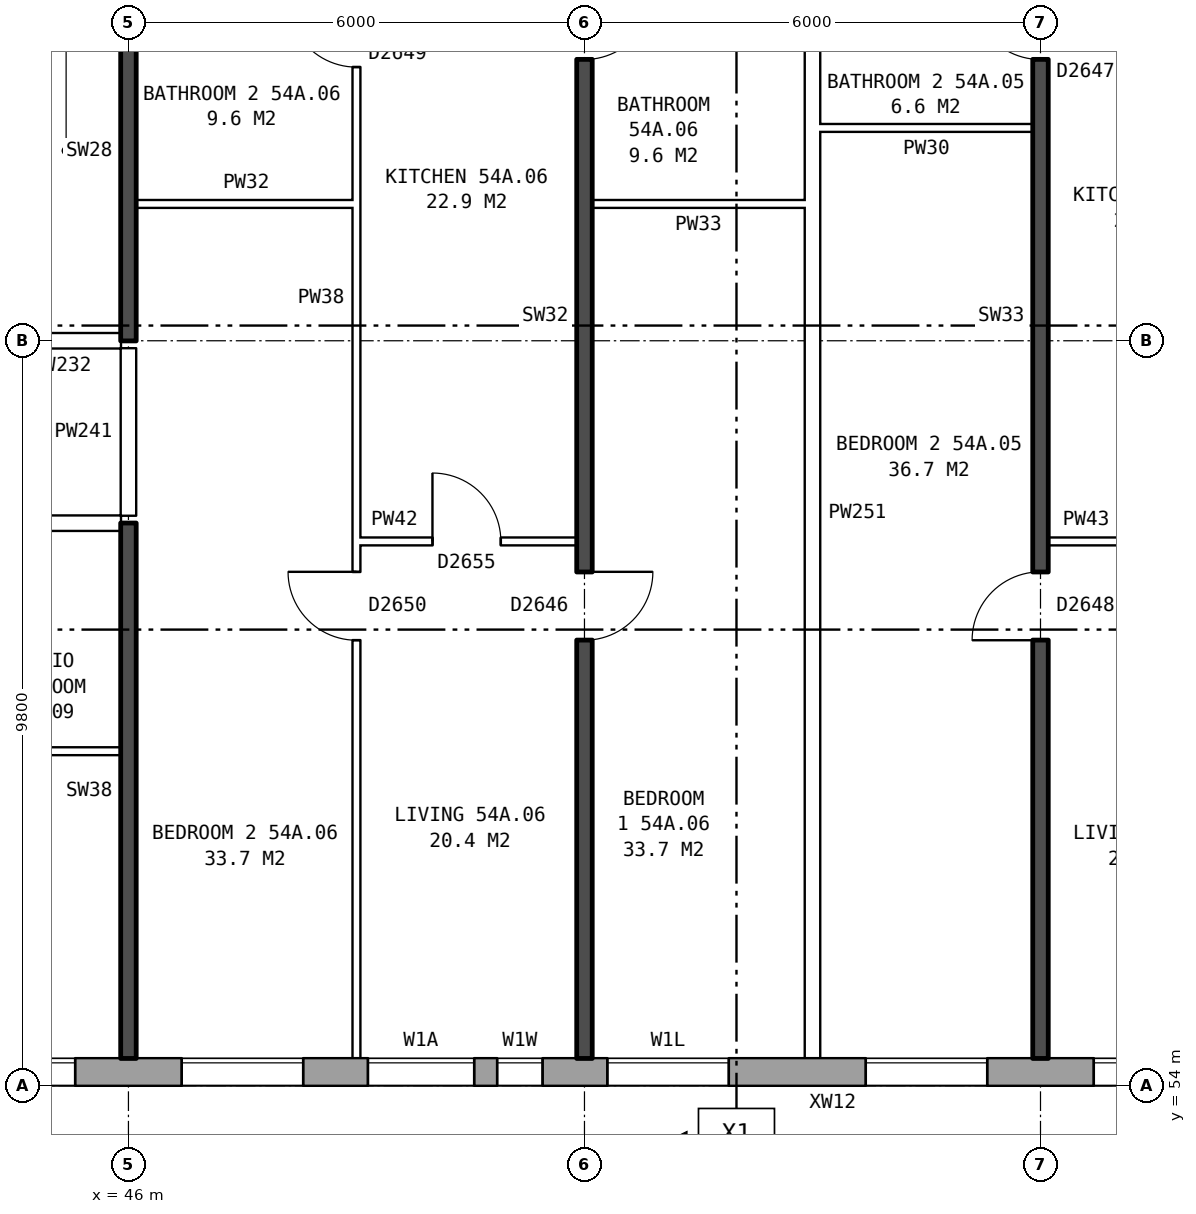
"""IFC4 building model, lengths in metres.
Left out: names, types, materials, properties, quantities, classifications, styles, units other than length and angle.
Written with IfcOpenShell. Run it as: python <this file> out.ifc"""

import sys

from ifc_helpers import new_model, si_unit, direction, frame, frame_2d, origin, place, context, subcontext, project, spatial, rectangle, extrude, element, fill, save


model = new_model("IFC4")
c1 = context("Model", 3, precision=1e-05, world=origin(), true_north=direction((0.0, 1.0)))
c2 = subcontext(c1, "Body", "Model", "MODEL_VIEW")
j1 = project(units=[si_unit("LENGTHUNIT", "METRE"), si_unit("PLANEANGLEUNIT", "RADIAN")], contexts=[c1])
p1 = place(None, origin())
s1 = spatial("IfcSite", under=j1, at=p1, CompositionType="ELEMENT")
p2 = place(p1, origin())
s2 = spatial("IfcBuilding", under=s1, at=p2, CompositionType="ELEMENT")
p3 = place(p2, frame((0.0, 0.0, 191.3)))
s3 = spatial("IfcBuildingStorey", under=s2, at=p3, CompositionType="ELEMENT", Elevation=191.3)
p4 = place(p3, frame((33.325, 54.18, 0.0), z_axis=(0.0, 0.0, 1.0), x_axis=(1.0, 0.0, 0.0)))
e1 = element("IfcWall", 1, at=p4, inside=s3, PredefinedType="STANDARD", context=c2, shape_type="SweptSolid", body=[
    extrude(rectangle(XDim=39.601, YDim=0.36, at=frame_2d((19.8, 0.0))), origin(), (0.0, 0.0, 1.0), 2.85),
])
p5 = place(p4, frame((1.375, 0.0, 0.8)))
e2 = element("IfcOpeningElement", 2, at=p5, cuts=e1, PredefinedType="OPENING", context=c2, shape_type="SweptSolid", body=[
    extrude(rectangle(XDim=1.6, YDim=1.8, at=frame_2d((0.8, 0.9))), frame((0.0, 0.19, 0.0), z_axis=(0.0, -1.0, 0.0), x_axis=(1.0, 0.0, 0.0)), (0.0, 0.0, 1.0), 0.38),
])
p6 = place(p4, frame((4.375, 0.0, 0.8)))
e3 = element("IfcOpeningElement", 3, at=p6, cuts=e1, PredefinedType="OPENING", context=c2, shape_type="SweptSolid", body=[
    extrude(rectangle(XDim=1.6, YDim=1.8, at=frame_2d((0.8, 0.9))), frame((0.0, 0.19, 0.0), z_axis=(0.0, -1.0, 0.0), x_axis=(1.0, 0.0, 0.0)), (0.0, 0.0, 1.0), 0.38),
])
p7 = place(p4, frame((7.375, 0.0, 0.8)))
e4 = element("IfcOpeningElement", 4, at=p7, cuts=e1, PredefinedType="OPENING", context=c2, shape_type="SweptSolid", body=[
    extrude(rectangle(XDim=1.6, YDim=1.8, at=frame_2d((0.8, 0.9))), frame((0.0, 0.19, 0.0), z_axis=(0.0, -1.0, 0.0), x_axis=(1.0, 0.0, 0.0)), (0.0, 0.0, 1.0), 0.38),
])
p8 = place(p4, frame((10.375, 0.0, 0.8)))
e5 = element("IfcOpeningElement", 5, at=p8, cuts=e1, PredefinedType="OPENING", context=c2, shape_type="SweptSolid", body=[
    extrude(rectangle(XDim=1.6, YDim=1.8, at=frame_2d((0.8, 0.9))), frame((0.0, 0.19, 0.0), z_axis=(0.0, -1.0, 0.0), x_axis=(1.0, 0.0, 0.0)), (0.0, 0.0, 1.0), 0.38),
])
p9 = place(p4, frame((13.375, 0.0, 0.8)))
e6 = element("IfcOpeningElement", 6, at=p9, cuts=e1, PredefinedType="OPENING", context=c2, shape_type="SweptSolid", body=[
    extrude(rectangle(XDim=1.6, YDim=1.8, at=frame_2d((0.8, 0.9))), frame((0.0, 0.19, 0.0), z_axis=(0.0, -1.0, 0.0), x_axis=(1.0, 0.0, 0.0)), (0.0, 0.0, 1.0), 0.38),
])
p10 = place(p4, frame((15.825, 0.0, 0.8)))
e7 = element("IfcOpeningElement", 7, at=p10, cuts=e1, PredefinedType="OPENING", context=c2, shape_type="SweptSolid", body=[
    extrude(rectangle(XDim=1.4, YDim=1.8, at=frame_2d((0.7, 0.9))), frame((0.0, 0.19, 0.0), z_axis=(0.0, -1.0, 0.0), x_axis=(1.0, 0.0, 0.0)), (0.0, 0.0, 1.0), 0.38),
])
p11 = place(p4, frame((18.975, 0.0, 0.15)))
e8 = element("IfcOpeningElement", 8, at=p11, cuts=e1, PredefinedType="OPENING", context=c2, shape_type="SweptSolid", body=[
    extrude(rectangle(XDim=1.6, YDim=1.2, at=frame_2d((0.8, 0.6))), frame((0.0, 0.19, 0.0), z_axis=(0.0, -1.0, 0.0), x_axis=(1.0, 0.0, 0.0)), (0.0, 0.0, 1.0), 0.38),
])
p12 = place(p4, frame((22.375, 0.0, 0.8)))
e9 = element("IfcOpeningElement", 9, at=p12, cuts=e1, PredefinedType="OPENING", context=c2, shape_type="SweptSolid", body=[
    extrude(rectangle(XDim=1.6, YDim=1.8, at=frame_2d((0.8, 0.9))), frame((0.0, 0.19, 0.0), z_axis=(0.0, -1.0, 0.0), x_axis=(1.0, 0.0, 0.0)), (0.0, 0.0, 1.0), 0.38),
])
p13 = place(p4, frame((25.375, 0.0, 0.8)))
e10 = element("IfcOpeningElement", 10, at=p13, cuts=e1, PredefinedType="OPENING", context=c2, shape_type="SweptSolid", body=[
    extrude(rectangle(XDim=1.6, YDim=1.8, at=frame_2d((0.8, 0.9))), frame((0.0, 0.19, 0.0), z_axis=(0.0, -1.0, 0.0), x_axis=(1.0, 0.0, 0.0)), (0.0, 0.0, 1.0), 0.38),
])
p14 = place(p4, frame((28.375, 0.0, 0.8)))
e11 = element("IfcOpeningElement", 11, at=p14, cuts=e1, PredefinedType="OPENING", context=c2, shape_type="SweptSolid", body=[
    extrude(rectangle(XDim=1.6, YDim=1.8, at=frame_2d((0.8, 0.9))), frame((0.0, 0.19, 0.0), z_axis=(0.0, -1.0, 0.0), x_axis=(1.0, 0.0, 0.0)), (0.0, 0.0, 1.0), 0.38),
])
p15 = place(p4, frame((31.375, 0.0, 0.8)))
e12 = element("IfcOpeningElement", 12, at=p15, cuts=e1, PredefinedType="OPENING", context=c2, shape_type="SweptSolid", body=[
    extrude(rectangle(XDim=1.6, YDim=1.8, at=frame_2d((0.8, 0.9))), frame((0.0, 0.19, 0.0), z_axis=(0.0, -1.0, 0.0), x_axis=(1.0, 0.0, 0.0)), (0.0, 0.0, 1.0), 0.38),
])
p16 = place(p4, frame((34.375, 0.0, 0.8)))
e13 = element("IfcOpeningElement", 13, at=p16, cuts=e1, PredefinedType="OPENING", context=c2, shape_type="SweptSolid", body=[
    extrude(rectangle(XDim=1.6, YDim=1.8, at=frame_2d((0.8, 0.9))), frame((0.0, 0.19, 0.0), z_axis=(0.0, -1.0, 0.0), x_axis=(1.0, 0.0, 0.0)), (0.0, 0.0, 1.0), 0.38),
])
p17 = place(p4, frame((37.375, 0.0, 0.8)))
e14 = element("IfcOpeningElement", 14, at=p17, cuts=e1, PredefinedType="OPENING", context=c2, shape_type="SweptSolid", body=[
    extrude(rectangle(XDim=1.6, YDim=1.8, at=frame_2d((0.8, 0.9))), frame((0.0, 0.19, 0.0), z_axis=(0.0, -1.0, 0.0), x_axis=(1.0, 0.0, 0.0)), (0.0, 0.0, 1.0), 0.38),
])
p18 = place(p4, frame((17.525, 0.0, 1.6)))
e15 = element("IfcOpeningElement", 15, at=p18, cuts=e1, PredefinedType="OPENING", context=c2, shape_type="SweptSolid", body=[
    extrude(rectangle(XDim=0.6, YDim=0.9, at=frame_2d((0.3, 0.45))), frame((0.0, 0.19, 0.0), z_axis=(0.0, -1.0, 0.0), x_axis=(1.0, 0.0, 0.0)), (0.0, 0.0, 1.0), 0.38),
])
p19 = place(p3, frame((43.6, 58.4, 0.0), z_axis=(0.0, 0.0, 1.0), x_axis=(1.0, 0.0, 0.0)))
e16 = element("IfcWall", 16, at=p19, inside=s3, PredefinedType="PARTITIONING", context=c2, shape_type="SweptSolid", body=[
    extrude(rectangle(XDim=2.3, YDim=0.1, at=frame_2d((1.15, 0.0))), origin(), (0.0, 0.0, 1.0), 2.85),
])
p20 = place(p3, frame((49.0, 61.16, 0.0), z_axis=(0.0, 0.0, 1.0), x_axis=(1.0, 0.0, 0.0)))
e17 = element("IfcWall", 17, at=p20, inside=s3, PredefinedType="PARTITIONING", context=c2, shape_type="SweptSolid", body=[
    extrude(rectangle(XDim=2.9, YDim=0.1, at=frame_2d((1.45, 0.0))), origin(), (0.0, 0.0, 1.0), 2.85),
])
p21 = place(p20, frame((1.0, 0.0, 0.0)))
e18 = element("IfcOpeningElement", 18, at=p21, cuts=e17, PredefinedType="OPENING", context=c2, shape_type="SweptSolid", body=[
    extrude(rectangle(XDim=0.9, YDim=2.1, at=frame_2d((0.45, 1.05))), frame((0.0, 0.06, 0.0), z_axis=(0.0, -1.0, 0.0), x_axis=(1.0, 0.0, 0.0)), (0.0, 0.0, 1.0), 0.12),
])
p22 = place(p3, frame((58.1, 61.16, 0.0), z_axis=(0.0, 0.0, 1.0), x_axis=(1.0, 0.0, 0.0)))
e19 = element("IfcWall", 19, at=p22, inside=s3, PredefinedType="PARTITIONING", context=c2, shape_type="SweptSolid", body=[
    extrude(rectangle(XDim=2.9, YDim=0.1, at=frame_2d((1.45, 0.0))), origin(), (0.0, 0.0, 1.0), 2.85),
])
p23 = place(p22, frame((1.0, 0.0, 0.0)))
e20 = element("IfcOpeningElement", 20, at=p23, cuts=e19, PredefinedType="OPENING", context=c2, shape_type="SweptSolid", body=[
    extrude(rectangle(XDim=0.9, YDim=2.1, at=frame_2d((0.45, 1.05))), frame((0.0, 0.06, 0.0), z_axis=(0.0, -1.0, 0.0), x_axis=(1.0, 0.0, 0.0)), (0.0, 0.0, 1.0), 0.12),
])
p24 = place(p3, frame((30.61, 61.4, 0.0), z_axis=(0.0, 0.0, 1.0), x_axis=(1.0, 0.0, 0.0)))
e21 = element("IfcWall", 21, at=p24, inside=s3, PredefinedType="PARTITIONING", context=c2, shape_type="SweptSolid", body=[
    extrude(rectangle(XDim=15.29, YDim=0.2, at=frame_2d((7.645, 0.0))), origin(), (0.0, 0.0, 1.0), 2.85),
])
p25 = place(p24, frame((10.69, 0.0, 0.0)))
e22 = element("IfcOpeningElement", 22, at=p25, cuts=e21, PredefinedType="OPENING", context=c2, shape_type="SweptSolid", body=[
    extrude(rectangle(XDim=1.0, YDim=2.1, at=frame_2d((0.5, 1.05))), frame((0.0, 0.11, 0.0), z_axis=(0.0, -1.0, 0.0), x_axis=(1.0, 0.0, 0.0)), (0.0, 0.0, 1.0), 0.22),
])
p26 = place(p24, frame((5.89, 0.0, 0.0)))
e23 = element("IfcOpeningElement", 23, at=p26, cuts=e21, PredefinedType="OPENING", context=c2, shape_type="SweptSolid", body=[
    extrude(rectangle(XDim=1.0, YDim=2.1, at=frame_2d((0.5, 1.05))), frame((0.0, 0.11, 0.0), z_axis=(0.0, -1.0, 0.0), x_axis=(1.0, 0.0, 0.0)), (0.0, 0.0, 1.0), 0.22),
])
p27 = place(p3, frame((44.36, 63.8, 0.0), z_axis=(0.0, 0.0, 1.0), x_axis=(1.0, 0.0, 0.0)))
e24 = element("IfcWall", 24, at=p27, inside=s3, PredefinedType="PARTITIONING", context=c2, shape_type="SweptSolid", body=[
    extrude(rectangle(XDim=1.54, YDim=0.2, at=frame_2d((0.77, 0.0))), origin(), (0.0, 0.0, 1.0), 2.85),
])
p28 = place(p3, frame((46.1, 65.6, 0.0), z_axis=(0.0, 0.0, 1.0), x_axis=(1.0, 0.0, 0.0)))
e25 = element("IfcWall", 25, at=p28, inside=s3, PredefinedType="PARTITIONING", context=c2, shape_type="SweptSolid", body=[
    extrude(rectangle(XDim=2.9, YDim=0.1, at=frame_2d((1.45, 0.0))), origin(), (0.0, 0.0, 1.0), 2.85),
])
for number, where, z_axis, x_axis in (
    (26, (52.1, 65.6, 0.0), (0.0, 0.0, 1.0), (1.0, 0.0, 0.0)),
    (27, (55.1, 66.6, 0.0), (0.0, 0.0, 1.0), (1.0, 0.0, 0.0)),
):
    element("IfcWall", number, at=place(p3, frame(where, z_axis=z_axis, x_axis=x_axis)), inside=s3, PredefinedType="PARTITIONING", context=c2, shape_type="SweptSolid", body=[
        extrude(rectangle(XDim=2.8, YDim=0.1, at=frame_2d((1.4, 0.0))), origin(), (0.0, 0.0, 1.0), 2.85),
    ])
p29 = place(p3, frame((46.0, 54.36, 0.0), z_axis=(0.0, 0.0, 1.0), x_axis=(0.0, 1.0, 0.0)))
e28 = element("IfcWall", 28, at=p29, inside=s3, PredefinedType="SOLIDWALL", context=c2, shape_type="SweptSolid", body=[
    extrude(rectangle(XDim=7.04, YDim=0.2, at=frame_2d((3.52, 0.0))), origin(), (0.0, 0.0, 1.0), 2.85),
])
p30 = place(p3, frame((46.0, 61.5, 0.0), z_axis=(0.0, 0.0, 1.0), x_axis=(0.0, 1.0, 0.0)))
e29 = element("IfcWall", 29, at=p30, inside=s3, PredefinedType="PARTITIONING", context=c2, shape_type="SweptSolid", body=[
    extrude(rectangle(XDim=2.2, YDim=0.2, at=frame_2d((1.1, 0.0))), origin(), (0.0, 0.0, 1.0), 2.85),
])
p31 = place(p3, frame((46.0, 63.8, 0.0), z_axis=(0.0, 0.0, 1.0), x_axis=(0.0, 1.0, 0.0)))
e30 = element("IfcWall", 30, at=p31, inside=s3, PredefinedType="SOLIDWALL", context=c2, shape_type="SweptSolid", body=[
    extrude(rectangle(XDim=5.0, YDim=0.2, at=frame_2d((2.5, 0.0))), origin(), (0.0, 0.0, 1.0), 2.85),
])
p32 = place(p3, frame((49.0, 54.36, 0.0), z_axis=(0.0, 0.0, 1.0), x_axis=(0.0, 1.0, 0.0)))
e31 = element("IfcWall", 31, at=p32, inside=s3, PredefinedType="PARTITIONING", context=c2, shape_type="SweptSolid", body=[
    extrude(rectangle(XDim=14.34, YDim=0.1, at=frame_2d((7.17, 0.0))), origin(), (0.0, 0.0, 1.0), 2.85),
])
p33 = place(p32, frame((5.5, 0.0, 0.0)))
e32 = element("IfcOpeningElement", 32, at=p33, cuts=e31, PredefinedType="OPENING", context=c2, shape_type="SweptSolid", body=[
    extrude(rectangle(XDim=0.9, YDim=2.1, at=frame_2d((0.45, 1.05))), frame((0.0, 0.06, 0.0), z_axis=(0.0, -1.0, 0.0), x_axis=(1.0, 0.0, 0.0)), (0.0, 0.0, 1.0), 0.12),
])
p34 = place(p32, frame((13.04, 0.0, 0.0)))
e33 = element("IfcOpeningElement", 33, at=p34, cuts=e31, PredefinedType="OPENING", context=c2, shape_type="SweptSolid", body=[
    extrude(rectangle(XDim=0.9, YDim=2.1, at=frame_2d((0.45, 1.05))), frame((0.0, 0.06, 0.0), z_axis=(0.0, -1.0, 0.0), x_axis=(1.0, 0.0, 0.0)), (0.0, 0.0, 1.0), 0.12),
])
p35 = place(p3, frame((52.0, 54.36, 0.0), z_axis=(0.0, 0.0, 1.0), x_axis=(0.0, 1.0, 0.0)))
e34 = element("IfcWall", 34, at=p35, inside=s3, PredefinedType="SOLIDWALL", context=c2, shape_type="SweptSolid", body=[
    extrude(rectangle(XDim=14.44, YDim=0.2, at=frame_2d((7.22, 0.0))), origin(), (0.0, 0.0, 1.0), 2.85),
])
p36 = place(p35, frame((5.5, 0.0, 0.0)))
e35 = element("IfcOpeningElement", 35, at=p36, cuts=e34, PredefinedType="OPENING", context=c2, shape_type="SweptSolid", body=[
    extrude(rectangle(XDim=0.9, YDim=2.1, at=frame_2d((0.45, 1.05))), frame((0.0, 0.11, 0.0), z_axis=(0.0, -1.0, 0.0), x_axis=(1.0, 0.0, 0.0)), (0.0, 0.0, 1.0), 0.22),
])
p37 = place(p35, frame((13.14, 0.0, 0.0)))
e36 = element("IfcOpeningElement", 36, at=p37, cuts=e34, PredefinedType="OPENING", context=c2, shape_type="SweptSolid", body=[
    extrude(rectangle(XDim=0.9, YDim=2.1, at=frame_2d((0.45, 1.05))), frame((0.0, 0.11, 0.0), z_axis=(0.0, -1.0, 0.0), x_axis=(1.0, 0.0, 0.0)), (0.0, 0.0, 1.0), 0.22),
])
p38 = place(p3, frame((55.0, 54.36, 0.0), z_axis=(0.0, 0.0, 1.0), x_axis=(0.0, 1.0, 0.0)))
e37 = element("IfcWall", 37, at=p38, inside=s3, PredefinedType="PARTITIONING", context=c2, shape_type="SweptSolid", body=[
    extrude(rectangle(XDim=14.34, YDim=0.2, at=frame_2d((7.17, 0.0))), origin(), (0.0, 0.0, 1.0), 2.85),
])
p39 = place(p3, frame((58.0, 54.36, 0.0), z_axis=(0.0, 0.0, 1.0), x_axis=(0.0, 1.0, 0.0)))
e38 = element("IfcWall", 38, at=p39, inside=s3, PredefinedType="SOLIDWALL", context=c2, shape_type="SweptSolid", body=[
    extrude(rectangle(XDim=14.44, YDim=0.2, at=frame_2d((7.22, 0.0))), origin(), (0.0, 0.0, 1.0), 2.85),
])
p40 = place(p39, frame((5.5, 0.0, 0.0)))
e39 = element("IfcOpeningElement", 39, at=p40, cuts=e38, PredefinedType="OPENING", context=c2, shape_type="SweptSolid", body=[
    extrude(rectangle(XDim=0.9, YDim=2.1, at=frame_2d((0.45, 1.05))), frame((0.0, 0.11, 0.0), z_axis=(0.0, -1.0, 0.0), x_axis=(1.0, 0.0, 0.0)), (0.0, 0.0, 1.0), 0.22),
])
p41 = place(p39, frame((13.14, 0.0, 0.0)))
e40 = element("IfcOpeningElement", 40, at=p41, cuts=e38, PredefinedType="OPENING", context=c2, shape_type="SweptSolid", body=[
    extrude(rectangle(XDim=0.9, YDim=2.1, at=frame_2d((0.45, 1.05))), frame((0.0, 0.11, 0.0), z_axis=(0.0, -1.0, 0.0), x_axis=(1.0, 0.0, 0.0)), (0.0, 0.0, 1.0), 0.22),
])
p42 = place(p8, origin())
e41 = element("IfcWindow", 41, at=p42, inside=s3, PartitioningType="SINGLE_PANEL", PredefinedType="WINDOW", context=c2, shape_type="SweptSolid", body=[
    extrude(rectangle(XDim=1.6, YDim=1.8, at=frame_2d((0.8, 0.9))), frame((0.0, 0.15, 0.0), z_axis=(0.0, -1.0, 0.0), x_axis=(1.0, 0.0, 0.0)), (0.0, 0.0, 1.0), 0.06),
])
fill(e5, e41)
p43 = place(p9, origin())
e42 = element("IfcWindow", 42, at=p43, inside=s3, PartitioningType="SINGLE_PANEL", PredefinedType="WINDOW", context=c2, shape_type="SweptSolid", body=[
    extrude(rectangle(XDim=1.6, YDim=1.8, at=frame_2d((0.8, 0.9))), frame((0.0, 0.15, 0.0), z_axis=(0.0, -1.0, 0.0), x_axis=(1.0, 0.0, 0.0)), (0.0, 0.0, 1.0), 0.06),
])
fill(e6, e42)
p44 = place(p10, origin())
e43 = element("IfcWindow", 43, at=p44, inside=s3, PartitioningType="SINGLE_PANEL", PredefinedType="WINDOW", context=c2, shape_type="SweptSolid", body=[
    extrude(rectangle(XDim=1.4, YDim=1.8, at=frame_2d((0.7, 0.9))), frame((0.0, 0.15, 0.0), z_axis=(0.0, -1.0, 0.0), x_axis=(1.0, 0.0, 0.0)), (0.0, 0.0, 1.0), 0.06),
])
fill(e7, e43)
p45 = place(p11, origin())
e44 = element("IfcWindow", 44, at=p45, inside=s3, PartitioningType="SINGLE_PANEL", PredefinedType="WINDOW", context=c2, shape_type="SweptSolid", body=[
    extrude(rectangle(XDim=1.6, YDim=1.2, at=frame_2d((0.8, 0.6))), frame((0.0, 0.15, 0.0), z_axis=(0.0, -1.0, 0.0), x_axis=(1.0, 0.0, 0.0)), (0.0, 0.0, 1.0), 0.06),
])
fill(e8, e44)
p46 = place(p12, origin())
e45 = element("IfcWindow", 45, at=p46, inside=s3, PartitioningType="SINGLE_PANEL", PredefinedType="WINDOW", context=c2, shape_type="SweptSolid", body=[
    extrude(rectangle(XDim=1.6, YDim=1.8, at=frame_2d((0.8, 0.9))), frame((0.0, 0.15, 0.0), z_axis=(0.0, -1.0, 0.0), x_axis=(1.0, 0.0, 0.0)), (0.0, 0.0, 1.0), 0.06),
])
fill(e9, e45)
p47 = place(p13, origin())
e46 = element("IfcWindow", 46, at=p47, inside=s3, PartitioningType="SINGLE_PANEL", PredefinedType="WINDOW", context=c2, shape_type="SweptSolid", body=[
    extrude(rectangle(XDim=1.6, YDim=1.8, at=frame_2d((0.8, 0.9))), frame((0.0, 0.15, 0.0), z_axis=(0.0, -1.0, 0.0), x_axis=(1.0, 0.0, 0.0)), (0.0, 0.0, 1.0), 0.06),
])
fill(e10, e46)
p48 = place(p40, origin())
e47 = element("IfcDoor", 47, at=p48, inside=s3, OperationType="SINGLE_SWING_LEFT", PredefinedType="DOOR", context=c2, shape_type="SweptSolid", body=[
    extrude(rectangle(XDim=0.9, YDim=2.1, at=frame_2d((0.45, 1.05))), frame((0.0, 0.025, 0.0), z_axis=(0.0, -1.0, 0.0), x_axis=(1.0, 0.0, 0.0)), (0.0, 0.0, 1.0), 0.05),
])
fill(e39, e47)
p49 = place(p41, origin())
e48 = element("IfcDoor", 48, at=p49, inside=s3, OperationType="SINGLE_SWING_RIGHT", PredefinedType="DOOR", context=c2, shape_type="SweptSolid", body=[
    extrude(rectangle(XDim=0.9, YDim=2.1, at=frame_2d((0.45, 1.05))), frame((0.0, 0.025, 0.0), z_axis=(0.0, -1.0, 0.0), x_axis=(1.0, 0.0, 0.0)), (0.0, 0.0, 1.0), 0.05),
])
fill(e40, e48)
p50 = place(p36, frame((0.9, 0.0, 0.0), z_axis=(0.0, 0.0, 1.0), x_axis=(-1.0, 0.0, 0.0)))
e49 = element("IfcDoor", 49, at=p50, inside=s3, OperationType="SINGLE_SWING_LEFT", PredefinedType="DOOR", context=c2, shape_type="SweptSolid", body=[
    extrude(rectangle(XDim=0.9, YDim=2.1, at=frame_2d((0.45, 1.05))), frame((0.0, 0.025, 0.0), z_axis=(0.0, -1.0, 0.0), x_axis=(1.0, 0.0, 0.0)), (0.0, 0.0, 1.0), 0.05),
])
fill(e35, e49)
p51 = place(p33, origin())
e50 = element("IfcDoor", 50, at=p51, inside=s3, OperationType="SINGLE_SWING_RIGHT", PredefinedType="DOOR", context=c2, shape_type="SweptSolid", body=[
    extrude(rectangle(XDim=0.9, YDim=2.1, at=frame_2d((0.45, 1.05))), frame((0.0, 0.025, 0.0), z_axis=(0.0, -1.0, 0.0), x_axis=(1.0, 0.0, 0.0)), (0.0, 0.0, 1.0), 0.05),
])
fill(e32, e50)
p52 = place(p21, origin())
e51 = element("IfcDoor", 51, at=p52, inside=s3, OperationType="SINGLE_SWING_LEFT", PredefinedType="DOOR", context=c2, shape_type="SweptSolid", body=[
    extrude(rectangle(XDim=0.9, YDim=2.1, at=frame_2d((0.45, 1.05))), frame((0.0, 0.025, 0.0), z_axis=(0.0, -1.0, 0.0), x_axis=(1.0, 0.0, 0.0)), (0.0, 0.0, 1.0), 0.05),
])
fill(e18, e51)
p53 = place(p37, frame((0.9, 0.0, 0.0), z_axis=(0.0, 0.0, 1.0), x_axis=(-1.0, 0.0, 0.0)))
e52 = element("IfcDoor", 52, at=p53, inside=s3, OperationType="SINGLE_SWING_LEFT", PredefinedType="DOOR", context=c2, shape_type="SweptSolid", body=[
    extrude(rectangle(XDim=0.9, YDim=2.1, at=frame_2d((0.45, 1.05))), frame((0.0, 0.025, 0.0), z_axis=(0.0, -1.0, 0.0), x_axis=(1.0, 0.0, 0.0)), (0.0, 0.0, 1.0), 0.05),
])
fill(e36, e52)
p54 = place(p34, origin())
e53 = element("IfcDoor", 53, at=p54, inside=s3, OperationType="SINGLE_SWING_RIGHT", PredefinedType="DOOR", context=c2, shape_type="SweptSolid", body=[
    extrude(rectangle(XDim=0.9, YDim=2.1, at=frame_2d((0.45, 1.05))), frame((0.0, 0.025, 0.0), z_axis=(0.0, -1.0, 0.0), x_axis=(1.0, 0.0, 0.0)), (0.0, 0.0, 1.0), 0.05),
])
fill(e33, e53)
p55 = place(p18, origin())
e54 = element("IfcWindow", 54, at=p55, inside=s3, PartitioningType="SINGLE_PANEL", PredefinedType="WINDOW", context=c2, shape_type="SweptSolid", body=[
    extrude(rectangle(XDim=0.6, YDim=0.9, at=frame_2d((0.3, 0.45))), frame((0.0, 0.15, 0.0), z_axis=(0.0, -1.0, 0.0), x_axis=(1.0, 0.0, 0.0)), (0.0, 0.0, 1.0), 0.06),
])
fill(e15, e54)
save(model, sys.argv[1])
